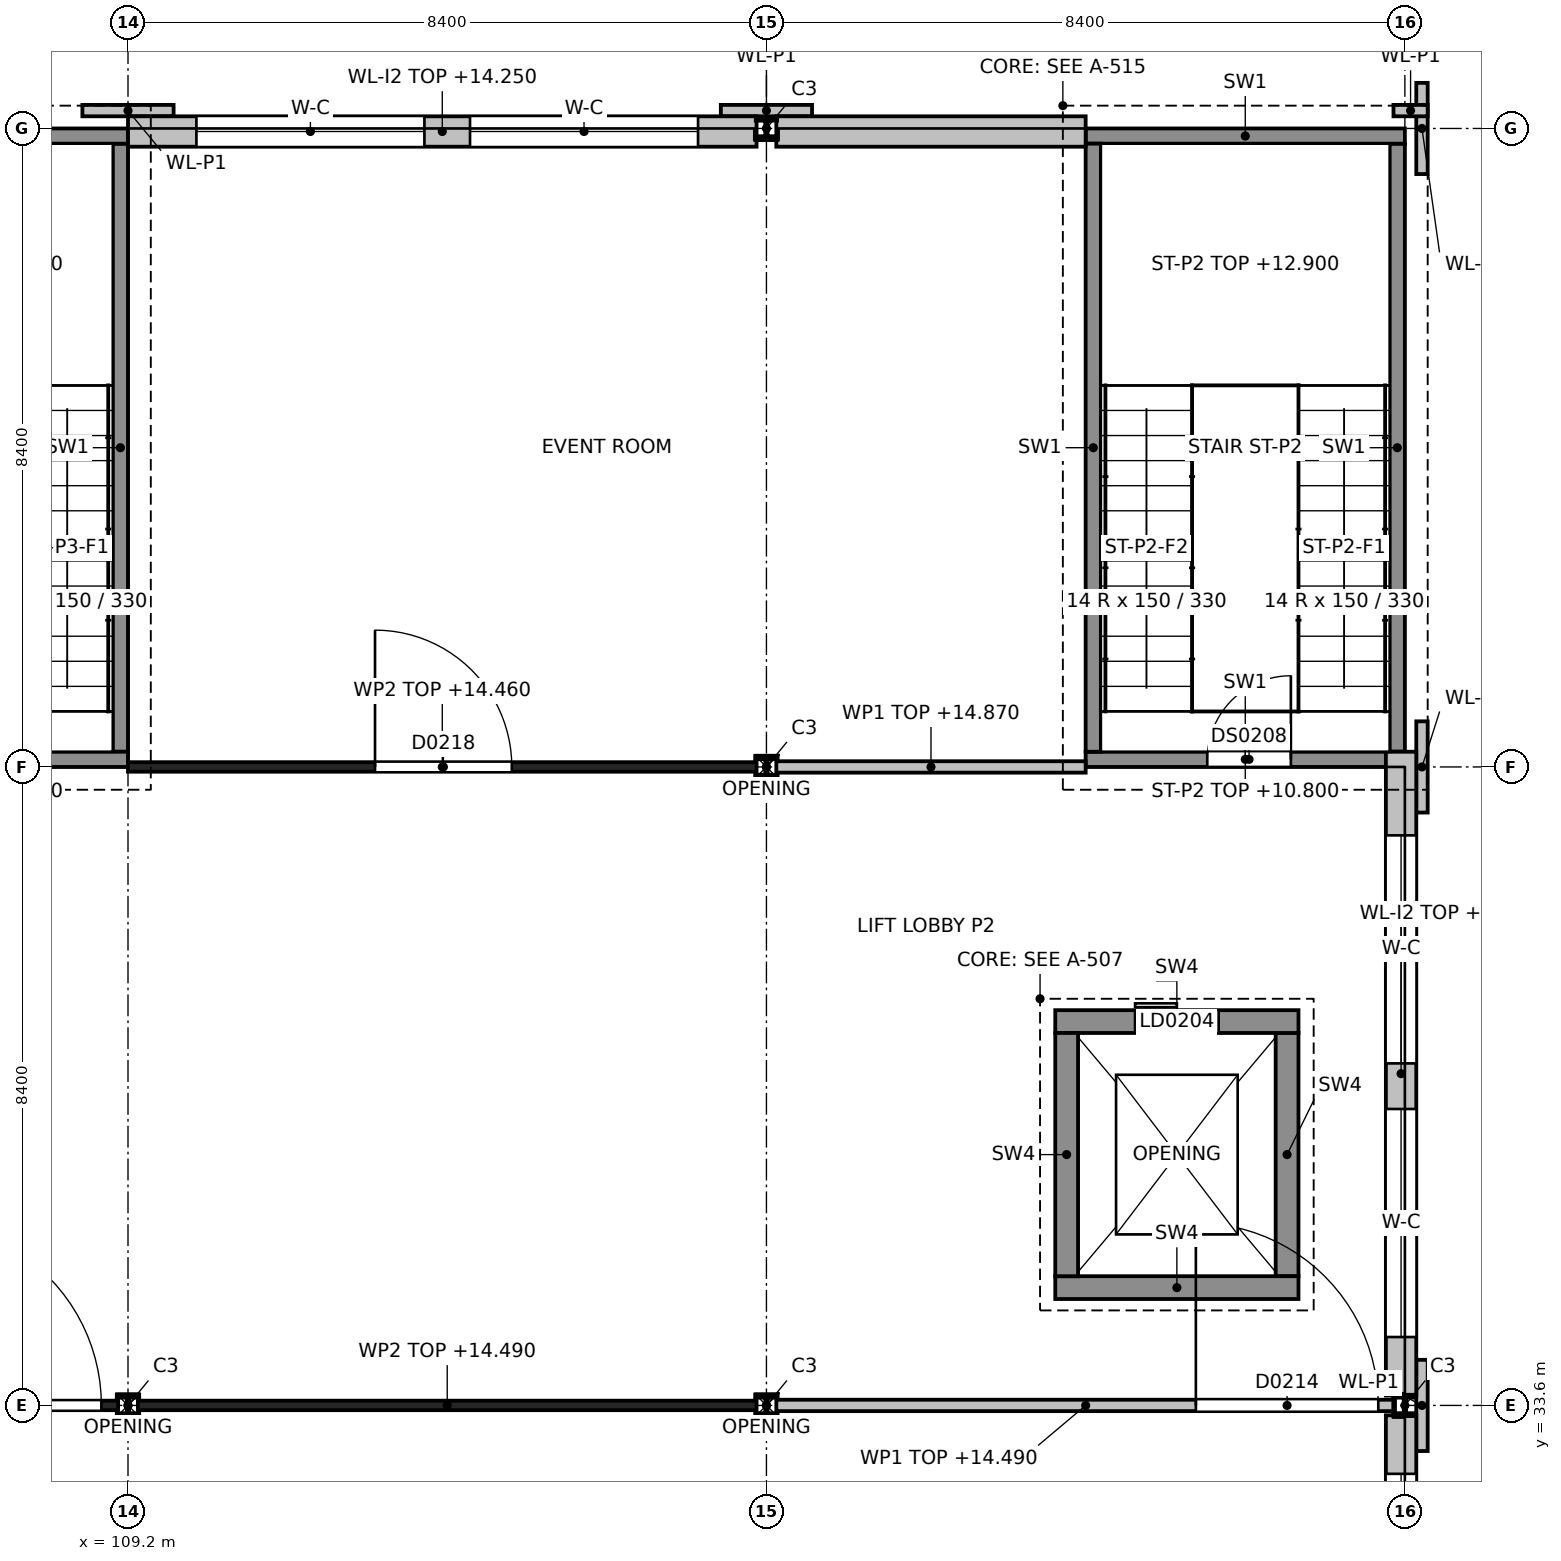
"""IFC4 building model, lengths in metres.
Left out: names, types, materials, properties, quantities, classifications, styles, units other than length and angle.
Written with IfcOpenShell. Run it as: python <this file> out.ifc"""

import sys

from ifc_helpers import new_model, si_unit, direction, frame, frame_2d, origin, origin_2d, place, context, subcontext, project, spatial, rectangle, i_section, extrude, element, fill, save


model = new_model("IFC4")
c1 = context("Model", 3, precision=1e-05, world=origin(), true_north=direction((0.0, 1.0)))
c2 = subcontext(c1, "Body", "Model", "MODEL_VIEW")
j1 = project(units=[si_unit("LENGTHUNIT", "METRE"), si_unit("PLANEANGLEUNIT", "RADIAN")], contexts=[c1])
p1 = place(None, origin())
s1 = spatial("IfcSite", under=j1, at=p1, CompositionType="ELEMENT")
p2 = place(p1, origin())
s2 = spatial("IfcBuilding", under=s1, at=p2, CompositionType="ELEMENT")
p3 = place(p2, frame((0.0, 0.0, 10.8)))
s3 = spatial("IfcBuildingStorey", under=s2, at=p3, CompositionType="ELEMENT", Elevation=10.8)
for number, where, z_axis, x_axis in (
    (1, (109.2, 33.6, 0.0), (0.0, 0.0, 1.0), (1.0, 0.0, 0.0)),
    (2, (117.6, 33.6, 0.0), (0.0, 0.0, 1.0), (1.0, 0.0, 0.0)),
    (3, (117.6, 42.0, 0.0), (0.0, 0.0, 1.0), (1.0, 0.0, 0.0)),
    (4, (117.6, 50.4, 0.0), (0.0, 0.0, 1.0), (1.0, 0.0, 0.0)),
    (5, (126.0, 33.6, 0.0), (0.0, 0.0, 1.0), (1.0, 0.0, 0.0)),
):
    element("IfcColumn", number, at=place(p3, frame(where, z_axis=z_axis, x_axis=x_axis)), inside=s3, PredefinedType="COLUMN", context=c2, shape_type="SweptSolid", body=[
        extrude(i_section(OverallWidth=0.26, OverallDepth=0.26, WebThickness=0.01, FlangeThickness=0.018, at=origin_2d()), origin(), (0.0, 0.0, 1.0), 4.2),
    ])
p4 = place(p3, frame((121.8, 42.1, 0.0), z_axis=(0.0, 0.0, 1.0), x_axis=(1.0, 0.0, 0.0)))
e6 = element("IfcWall", 6, at=p4, inside=s3, PredefinedType="SHEAR", context=c2, shape_type="SweptSolid", body=[
    extrude(rectangle(XDim=4.2, YDim=0.2, at=frame_2d((2.1, 0.0))), origin(), (0.0, 0.0, 1.0), 4.2),
])
p5 = place(p4, frame((1.6, 0.0, 0.0)))
e7 = element("IfcOpeningElement", 7, at=p5, cuts=e6, PredefinedType="OPENING", context=c2, shape_type="SweptSolid", body=[
    extrude(rectangle(XDim=1.1, YDim=2.1, at=frame_2d((0.55, 1.05))), frame((0.0, 0.1, 0.0), z_axis=(0.0, -1.0, 0.0), x_axis=(1.0, 0.0, 0.0)), (0.0, 0.0, 1.0), 0.2),
])
p6 = place(p3, frame((121.8, 50.3, 0.0), z_axis=(0.0, 0.0, 1.0), x_axis=(1.0, 0.0, 0.0)))
e8 = element("IfcWall", 8, at=p6, inside=s3, PredefinedType="SHEAR", context=c2, shape_type="SweptSolid", body=[
    extrude(rectangle(XDim=4.2, YDim=0.2, at=frame_2d((2.1, 0.0))), origin(), (0.0, 0.0, 1.0), 4.2),
])
for number, where, z_axis, x_axis in (
    (9, (121.9, 42.2, 0.0), (0.0, 0.0, 1.0), (0.0, 1.0, 0.0)),
    (10, (125.9, 42.2, 0.0), (0.0, 0.0, 1.0), (0.0, 1.0, 0.0)),
):
    element("IfcWall", number, at=place(p3, frame(where, z_axis=z_axis, x_axis=x_axis)), inside=s3, PredefinedType="SHEAR", context=c2, shape_type="SweptSolid", body=[
        extrude(rectangle(XDim=8.0, YDim=0.2, at=frame_2d((4.0, 0.0))), origin(), (0.0, 0.0, 1.0), 4.2),
    ])
p7 = place(p3, frame((105.0, 42.1, 0.0), z_axis=(0.0, 0.0, 1.0), x_axis=(1.0, 0.0, 0.0)))
e11 = element("IfcWall", 11, at=p7, inside=s3, PredefinedType="SHEAR", context=c2, shape_type="SweptSolid", body=[
    extrude(rectangle(XDim=4.2, YDim=0.2, at=frame_2d((2.1, 0.0))), origin(), (0.0, 0.0, 1.0), 4.2),
])
p8 = place(p7, frame((1.6, 0.0, 0.0)))
e12 = element("IfcOpeningElement", 12, at=p8, cuts=e11, PredefinedType="OPENING", context=c2, shape_type="SweptSolid", body=[
    extrude(rectangle(XDim=1.1, YDim=2.1, at=frame_2d((0.55, 1.05))), frame((0.0, 0.1, 0.0), z_axis=(0.0, -1.0, 0.0), x_axis=(1.0, 0.0, 0.0)), (0.0, 0.0, 1.0), 0.2),
])
p9 = place(p3, frame((105.0, 50.3, 0.0), z_axis=(0.0, 0.0, 1.0), x_axis=(1.0, 0.0, 0.0)))
e13 = element("IfcWall", 13, at=p9, inside=s3, PredefinedType="SHEAR", context=c2, shape_type="SweptSolid", body=[
    extrude(rectangle(XDim=4.2, YDim=0.2, at=frame_2d((2.1, 0.0))), origin(), (0.0, 0.0, 1.0), 4.2),
])
p10 = place(p3, frame((109.1, 42.2, 0.0), z_axis=(0.0, 0.0, 1.0), x_axis=(0.0, 1.0, 0.0)))
e14 = element("IfcWall", 14, at=p10, inside=s3, PredefinedType="SHEAR", context=c2, shape_type="SweptSolid", body=[
    extrude(rectangle(XDim=8.0, YDim=0.2, at=frame_2d((4.0, 0.0))), origin(), (0.0, 0.0, 1.0), 4.2),
])
p11 = place(p3, frame((121.4, 35.15, 0.0), z_axis=(0.0, 0.0, 1.0), x_axis=(1.0, 0.0, 0.0)))
e15 = element("IfcWall", 15, at=p11, inside=s3, PredefinedType="SHEAR", context=c2, shape_type="SweptSolid", body=[
    extrude(rectangle(XDim=3.2, YDim=0.3, at=frame_2d((1.6, 0.0))), origin(), (0.0, 0.0, 1.0), 4.2),
])
p12 = place(p3, frame((121.4, 38.65, 0.0), z_axis=(0.0, 0.0, 1.0), x_axis=(1.0, 0.0, 0.0)))
e16 = element("IfcWall", 16, at=p12, inside=s3, PredefinedType="SHEAR", context=c2, shape_type="SweptSolid", body=[
    extrude(rectangle(XDim=3.2, YDim=0.3, at=frame_2d((1.6, 0.0))), origin(), (0.0, 0.0, 1.0), 4.2),
])
p13 = place(p12, frame((1.05, 0.0, 0.0)))
e17 = element("IfcOpeningElement", 17, at=p13, cuts=e16, PredefinedType="OPENING", context=c2, shape_type="SweptSolid", body=[
    extrude(rectangle(XDim=1.1, YDim=2.1, at=frame_2d((0.55, 1.05))), frame((0.0, 0.15, 0.0), z_axis=(0.0, -1.0, 0.0), x_axis=(1.0, 0.0, 0.0)), (0.0, 0.0, 1.0), 0.3),
])
for number, where, z_axis, x_axis in (
    (18, (121.55, 35.3, 0.0), (0.0, 0.0, 1.0), (0.0, 1.0, 0.0)),
    (19, (124.45, 35.3, 0.0), (0.0, 0.0, 1.0), (0.0, 1.0, 0.0)),
):
    element("IfcWall", number, at=place(p3, frame(where, z_axis=z_axis, x_axis=x_axis)), inside=s3, PredefinedType="SHEAR", context=c2, shape_type="SweptSolid", body=[
        extrude(rectangle(XDim=3.2, YDim=0.3, at=frame_2d((1.6, 0.0))), origin(), (0.0, 0.0, 1.0), 4.2),
    ])
p14 = place(p3, frame((109.2, 50.36, 0.0), z_axis=(0.0, 0.0, 1.0), x_axis=(1.0, 0.0, 0.0)))
e20 = element("IfcWall", 20, at=p14, inside=s3, PredefinedType="SOLIDWALL", context=c2, shape_type="SweptSolid", body=[
    extrude(rectangle(XDim=8.27, YDim=0.4, at=frame_2d((4.135, 0.0))), origin(), (0.0, 0.0, 1.0), 3.45),
])
p15 = place(p14, frame((0.9, 0.0, 0.9)))
e21 = element("IfcOpeningElement", 21, at=p15, cuts=e20, PredefinedType="OPENING", context=c2, shape_type="SweptSolid", body=[
    extrude(rectangle(XDim=3.0, YDim=2.4, at=frame_2d((1.5, 1.2))), frame((0.0, 0.2, 0.0), z_axis=(0.0, -1.0, 0.0), x_axis=(1.0, 0.0, 0.0)), (0.0, 0.0, 1.0), 0.4),
])
p16 = place(p14, frame((4.5, 0.0, 0.9)))
e22 = element("IfcOpeningElement", 22, at=p16, cuts=e20, PredefinedType="OPENING", context=c2, shape_type="SweptSolid", body=[
    extrude(rectangle(XDim=3.0, YDim=2.4, at=frame_2d((1.5, 1.2))), frame((0.0, 0.2, 0.0), z_axis=(0.0, -1.0, 0.0), x_axis=(1.0, 0.0, 0.0)), (0.0, 0.0, 1.0), 0.4),
])
p17 = place(p3, frame((117.73, 50.36, 0.0), z_axis=(0.0, 0.0, 1.0), x_axis=(1.0, 0.0, 0.0)))
e23 = element("IfcWall", 23, at=p17, inside=s3, PredefinedType="SOLIDWALL", context=c2, shape_type="SweptSolid", body=[
    extrude(rectangle(XDim=4.07, YDim=0.4, at=frame_2d((2.035, 0.0))), origin(), (0.0, 0.0, 1.0), 3.45),
])
for number, where, z_axis, x_axis in (
    (24, (108.6, 50.635, 0.0), (0.0, 0.0, 1.0), (1.0, 0.0, 0.0)),
    (25, (117.0, 50.635, 0.0), (0.0, 0.0, 1.0), (1.0, 0.0, 0.0)),
):
    element("IfcWall", number, at=place(p3, frame(where, z_axis=z_axis, x_axis=x_axis)), inside=s3, PredefinedType="SOLIDWALL", context=c2, shape_type="SweptSolid", body=[
        extrude(rectangle(XDim=1.2, YDim=0.15, at=frame_2d((0.6, 0.0))), origin(), (0.0, 0.0, 1.0), 4.2),
    ])
p18 = place(p3, frame((125.85, 50.635, 0.0), z_axis=(0.0, 0.0, 1.0), x_axis=(1.0, 0.0, 0.0)))
e26 = element("IfcWall", 26, at=p18, inside=s3, PredefinedType="SOLIDWALL", context=c2, shape_type="SweptSolid", body=[
    extrude(rectangle(XDim=0.45, YDim=0.15, at=frame_2d((0.225, 0.0))), origin(), (0.0, 0.0, 1.0), 4.2),
])
p19 = place(p3, frame((125.95, 25.33, 0.0), z_axis=(0.0, 0.0, 1.0), x_axis=(0.0, 1.0, 0.0)))
e27 = element("IfcWall", 27, at=p19, inside=s3, PredefinedType="SOLIDWALL", context=c2, shape_type="SweptSolid", body=[
    extrude(rectangle(XDim=8.14, YDim=0.4, at=frame_2d((4.07, 0.0))), origin(), (0.0, 0.0, 1.0), 3.45),
])
p20 = place(p19, frame((0.77, 0.0, 0.9)))
e28 = element("IfcOpeningElement", 28, at=p20, cuts=e27, PredefinedType="OPENING", context=c2, shape_type="SweptSolid", body=[
    extrude(rectangle(XDim=3.0, YDim=2.4, at=frame_2d((1.5, 1.2))), frame((0.0, 0.2, 0.0), z_axis=(0.0, -1.0, 0.0), x_axis=(1.0, 0.0, 0.0)), (0.0, 0.0, 1.0), 0.4),
])
p21 = place(p19, frame((4.37, 0.0, 0.9)))
e29 = element("IfcOpeningElement", 29, at=p21, cuts=e27, PredefinedType="OPENING", context=c2, shape_type="SweptSolid", body=[
    extrude(rectangle(XDim=3.0, YDim=2.4, at=frame_2d((1.5, 1.2))), frame((0.0, 0.2, 0.0), z_axis=(0.0, -1.0, 0.0), x_axis=(1.0, 0.0, 0.0)), (0.0, 0.0, 1.0), 0.4),
])
p22 = place(p3, frame((125.95, 33.73, 0.0), z_axis=(0.0, 0.0, 1.0), x_axis=(0.0, 1.0, 0.0)))
e30 = element("IfcWall", 30, at=p22, inside=s3, PredefinedType="SOLIDWALL", context=c2, shape_type="SweptSolid", body=[
    extrude(rectangle(XDim=8.47, YDim=0.4, at=frame_2d((4.235, 0.0))), origin(), (0.0, 0.0, 1.0), 3.45),
])
p23 = place(p22, frame((0.77, 0.0, 0.9)))
e31 = element("IfcOpeningElement", 31, at=p23, cuts=e30, PredefinedType="OPENING", context=c2, shape_type="SweptSolid", body=[
    extrude(rectangle(XDim=3.0, YDim=2.4, at=frame_2d((1.5, 1.2))), frame((0.0, 0.2, 0.0), z_axis=(0.0, -1.0, 0.0), x_axis=(1.0, 0.0, 0.0)), (0.0, 0.0, 1.0), 0.4),
])
p24 = place(p22, frame((4.37, 0.0, 0.9)))
e32 = element("IfcOpeningElement", 32, at=p24, cuts=e30, PredefinedType="OPENING", context=c2, shape_type="SweptSolid", body=[
    extrude(rectangle(XDim=3.0, YDim=2.4, at=frame_2d((1.5, 1.2))), frame((0.0, 0.2, 0.0), z_axis=(0.0, -1.0, 0.0), x_axis=(1.0, 0.0, 0.0)), (0.0, 0.0, 1.0), 0.4),
])
p25 = place(p3, frame((126.225, 33.0, 0.0), z_axis=(0.0, 0.0, 1.0), x_axis=(0.0, 1.0, 0.0)))
e33 = element("IfcWall", 33, at=p25, inside=s3, PredefinedType="SOLIDWALL", context=c2, shape_type="SweptSolid", body=[
    extrude(rectangle(XDim=1.2, YDim=0.15, at=frame_2d((0.6, 0.0))), origin(), (0.0, 0.0, 1.0), 4.2),
])
p26 = place(p3, frame((126.225, 41.4, 0.0), z_axis=(0.0, 0.0, 1.0), x_axis=(0.0, 1.0, 0.0)))
e34 = element("IfcWall", 34, at=p26, inside=s3, PredefinedType="SOLIDWALL", context=c2, shape_type="SweptSolid", body=[
    extrude(rectangle(XDim=1.2, YDim=0.15, at=frame_2d((0.6, 0.0))), origin(), (0.0, 0.0, 1.0), 4.2),
])
p27 = place(p3, frame((126.225, 49.8, 0.0), z_axis=(0.0, 0.0, 1.0), x_axis=(0.0, 1.0, 0.0)))
e35 = element("IfcWall", 35, at=p27, inside=s3, PredefinedType="SOLIDWALL", context=c2, shape_type="SweptSolid", body=[
    extrude(rectangle(XDim=1.2, YDim=0.15, at=frame_2d((0.6, 0.0))), origin(), (0.0, 0.0, 1.0), 4.2),
])
p28 = place(p3, frame((100.93, 33.6, 0.0), z_axis=(0.0, 0.0, 1.0), x_axis=(1.0, 0.0, 0.0)))
e36 = element("IfcWall", 36, at=p28, inside=s3, PredefinedType="PARTITIONING", context=c2, shape_type="SweptSolid", body=[
    extrude(rectangle(XDim=8.14, YDim=0.125, at=frame_2d((4.07, 0.0))), origin(), (0.0, 0.0, 1.0), 3.65),
])
p29 = place(p28, frame((5.52, 0.0, 0.0)))
e37 = element("IfcOpeningElement", 37, at=p29, cuts=e36, PredefinedType="OPENING", context=c2, shape_type="SweptSolid", body=[
    extrude(rectangle(XDim=2.4, YDim=2.4, at=frame_2d((1.2, 1.2))), frame((0.0, 0.062, 0.0), z_axis=(0.0, -1.0, 0.0), x_axis=(1.0, 0.0, 0.0)), (0.0, 0.0, 1.0), 0.125),
])
p30 = place(p3, frame((109.33, 33.6, 0.0), z_axis=(0.0, 0.0, 1.0), x_axis=(1.0, 0.0, 0.0)))
e38 = element("IfcWall", 38, at=p30, inside=s3, PredefinedType="PARTITIONING", context=c2, shape_type="SweptSolid", body=[
    extrude(rectangle(XDim=8.14, YDim=0.125, at=frame_2d((4.07, 0.0))), origin(), (0.0, 0.0, 1.0), 3.69),
])
p31 = place(p3, frame((117.73, 33.6, 0.0), z_axis=(0.0, 0.0, 1.0), x_axis=(1.0, 0.0, 0.0)))
e39 = element("IfcWall", 39, at=p31, inside=s3, PredefinedType="PARTITIONING", context=c2, shape_type="SweptSolid", body=[
    extrude(rectangle(XDim=8.14, YDim=0.15, at=frame_2d((4.07, 0.0))), origin(), (0.0, 0.0, 1.0), 3.69),
])
p32 = place(p31, frame((5.52, 0.0, 0.0)))
e40 = element("IfcOpeningElement", 40, at=p32, cuts=e39, PredefinedType="OPENING", context=c2, shape_type="SweptSolid", body=[
    extrude(rectangle(XDim=2.4, YDim=2.4, at=frame_2d((1.2, 1.2))), frame((0.0, 0.075, 0.0), z_axis=(0.0, -1.0, 0.0), x_axis=(1.0, 0.0, 0.0)), (0.0, 0.0, 1.0), 0.15),
])
p33 = place(p3, frame((109.2, 42.0, 0.0), z_axis=(0.0, 0.0, 1.0), x_axis=(1.0, 0.0, 0.0)))
e41 = element("IfcWall", 41, at=p33, inside=s3, PredefinedType="PARTITIONING", context=c2, shape_type="SweptSolid", body=[
    extrude(rectangle(XDim=8.27, YDim=0.125, at=frame_2d((4.135, 0.0))), origin(), (0.0, 0.0, 1.0), 3.66),
])
p34 = place(p33, frame((3.25, 0.0, 0.0)))
e42 = element("IfcOpeningElement", 42, at=p34, cuts=e41, PredefinedType="OPENING", context=c2, shape_type="SweptSolid", body=[
    extrude(rectangle(XDim=1.8, YDim=2.1, at=frame_2d((0.9, 1.05))), frame((0.0, 0.062, 0.0), z_axis=(0.0, -1.0, 0.0), x_axis=(1.0, 0.0, 0.0)), (0.0, 0.0, 1.0), 0.125),
])
p35 = place(p3, frame((117.73, 42.0, 0.0), z_axis=(0.0, 0.0, 1.0), x_axis=(1.0, 0.0, 0.0)))
e43 = element("IfcWall", 43, at=p35, inside=s3, PredefinedType="PARTITIONING", context=c2, shape_type="SweptSolid", body=[
    extrude(rectangle(XDim=4.07, YDim=0.15, at=frame_2d((2.035, 0.0))), origin(), (0.0, 0.0, 1.0), 4.07),
])
p36 = place(p15, origin())
e44 = element("IfcWindow", 44, at=p36, inside=s3, PartitioningType="SINGLE_PANEL", PredefinedType="WINDOW", context=c2, shape_type="SweptSolid", body=[
    extrude(rectangle(XDim=3.0, YDim=2.4, at=frame_2d((1.5, 1.2))), frame((0.0, 0.03, 0.0), z_axis=(0.0, -1.0, 0.0), x_axis=(1.0, 0.0, 0.0)), (0.0, 0.0, 1.0), 0.06),
])
fill(e21, e44)
p37 = place(p16, origin())
e45 = element("IfcWindow", 45, at=p37, inside=s3, PartitioningType="SINGLE_PANEL", PredefinedType="WINDOW", context=c2, shape_type="SweptSolid", body=[
    extrude(rectangle(XDim=3.0, YDim=2.4, at=frame_2d((1.5, 1.2))), frame((0.0, 0.03, 0.0), z_axis=(0.0, -1.0, 0.0), x_axis=(1.0, 0.0, 0.0)), (0.0, 0.0, 1.0), 0.06),
])
fill(e22, e45)
p38 = place(p21, origin())
e46 = element("IfcWindow", 46, at=p38, inside=s3, PartitioningType="SINGLE_PANEL", PredefinedType="WINDOW", context=c2, shape_type="SweptSolid", body=[
    extrude(rectangle(XDim=3.0, YDim=2.4, at=frame_2d((1.5, 1.2))), frame((0.0, 0.03, 0.0), z_axis=(0.0, -1.0, 0.0), x_axis=(1.0, 0.0, 0.0)), (0.0, 0.0, 1.0), 0.06),
])
fill(e29, e46)
p39 = place(p23, origin())
e47 = element("IfcWindow", 47, at=p39, inside=s3, PartitioningType="SINGLE_PANEL", PredefinedType="WINDOW", context=c2, shape_type="SweptSolid", body=[
    extrude(rectangle(XDim=3.0, YDim=2.4, at=frame_2d((1.5, 1.2))), frame((0.0, 0.03, 0.0), z_axis=(0.0, -1.0, 0.0), x_axis=(1.0, 0.0, 0.0)), (0.0, 0.0, 1.0), 0.06),
])
fill(e31, e47)
p40 = place(p24, origin())
e48 = element("IfcWindow", 48, at=p40, inside=s3, PartitioningType="SINGLE_PANEL", PredefinedType="WINDOW", context=c2, shape_type="SweptSolid", body=[
    extrude(rectangle(XDim=3.0, YDim=2.4, at=frame_2d((1.5, 1.2))), frame((0.0, 0.03, 0.0), z_axis=(0.0, -1.0, 0.0), x_axis=(1.0, 0.0, 0.0)), (0.0, 0.0, 1.0), 0.06),
])
fill(e32, e48)
p41 = place(p29, origin())
e49 = element("IfcDoor", 49, at=p41, inside=s3, OperationType="DOUBLE_DOOR_DOUBLE_SWING", PredefinedType="DOOR", context=c2, shape_type="SweptSolid", body=[
    extrude(rectangle(XDim=2.4, YDim=2.4, at=frame_2d((1.2, 1.2))), frame((0.0, 0.025, 0.0), z_axis=(0.0, -1.0, 0.0), x_axis=(1.0, 0.0, 0.0)), (0.0, 0.0, 1.0), 0.05),
])
fill(e37, e49)
p42 = place(p32, origin())
e50 = element("IfcDoor", 50, at=p42, inside=s3, OperationType="DOUBLE_DOOR_DOUBLE_SWING", PredefinedType="DOOR", context=c2, shape_type="SweptSolid", body=[
    extrude(rectangle(XDim=2.4, YDim=2.4, at=frame_2d((1.2, 1.2))), frame((0.0, 0.025, 0.0), z_axis=(0.0, -1.0, 0.0), x_axis=(1.0, 0.0, 0.0)), (0.0, 0.0, 1.0), 0.05),
])
fill(e40, e50)
p43 = place(p34, origin())
e51 = element("IfcDoor", 51, at=p43, inside=s3, OperationType="DOUBLE_DOOR_DOUBLE_SWING", PredefinedType="DOOR", context=c2, shape_type="SweptSolid", body=[
    extrude(rectangle(XDim=1.8, YDim=2.1, at=frame_2d((0.9, 1.05))), frame((0.0, 0.025, 0.0), z_axis=(0.0, -1.0, 0.0), x_axis=(1.0, 0.0, 0.0)), (0.0, 0.0, 1.0), 0.05),
])
fill(e42, e51)
p44 = place(p5, origin())
e52 = element("IfcDoor", 52, at=p44, inside=s3, OperationType="SINGLE_SWING_RIGHT", PredefinedType="DOOR", context=c2, shape_type="SweptSolid", body=[
    extrude(rectangle(XDim=1.1, YDim=2.1, at=frame_2d((0.55, 1.05))), frame((0.0, 0.025, 0.0), z_axis=(0.0, -1.0, 0.0), x_axis=(1.0, 0.0, 0.0)), (0.0, 0.0, 1.0), 0.05),
])
fill(e7, e52)
p45 = place(p13, origin())
e53 = element("IfcDoor", 53, at=p45, inside=s3, OperationType="SLIDING_TO_RIGHT", PredefinedType="DOOR", context=c2, shape_type="SweptSolid", body=[
    extrude(rectangle(XDim=1.1, YDim=2.1, at=frame_2d((0.55, 1.05))), frame((0.0, 0.025, 0.0), z_axis=(0.0, -1.0, 0.0), x_axis=(1.0, 0.0, 0.0)), (0.0, 0.0, 1.0), 0.05),
])
fill(e17, e53)
save(model, sys.argv[1])
